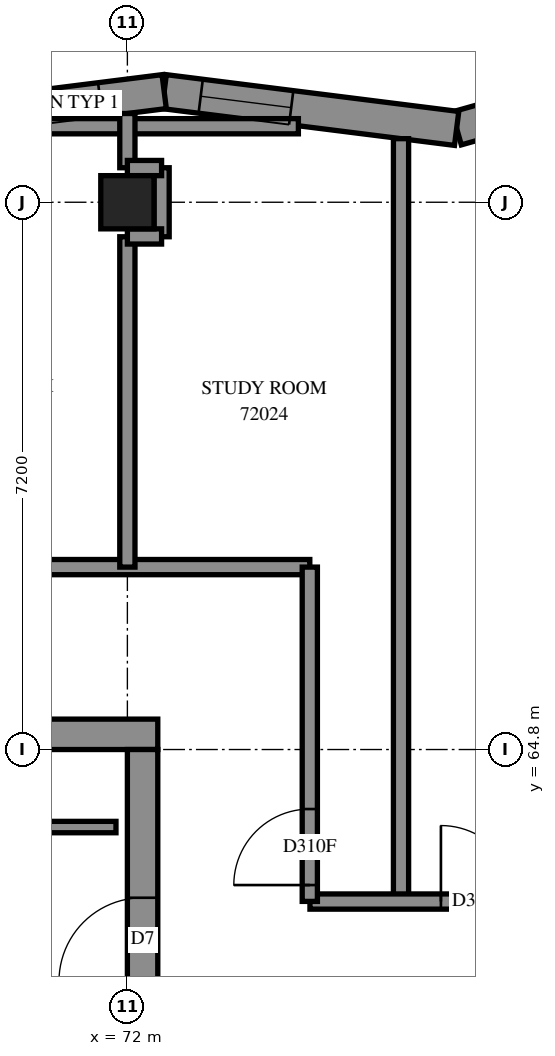
"""IFC4 building model, lengths in metres.
Left out: names, types, materials, properties, quantities, classifications, styles, units other than length and angle.
Written with IfcOpenShell. Run it as: python <this file> out.ifc"""

import sys

from ifc_helpers import new_model, si_unit, direction, frame, frame_2d, origin, origin_2d, place, context, subcontext, project, spatial, polyline, rectangle, outline, extrude, element, fill, save


model = new_model("IFC4")
c1 = context("Model", 3, precision=1e-05, world=origin(), true_north=direction((0.0, 1.0)))
c2 = subcontext(c1, "Body", "Model", "MODEL_VIEW")
j1 = project(units=[si_unit("LENGTHUNIT", "METRE"), si_unit("PLANEANGLEUNIT", "RADIAN")], contexts=[c1])
p1 = place(None, origin())
s1 = spatial("IfcSite", under=j1, at=p1, CompositionType="ELEMENT")
p2 = place(p1, origin())
s2 = spatial("IfcBuilding", under=s1, at=p2, CompositionType="ELEMENT")
p3 = place(p2, frame((0.0, 0.0, 264.2)))
s3 = spatial("IfcBuildingStorey", under=s2, at=p3, CompositionType="ELEMENT", Elevation=264.2)
p4 = place(p3, frame((72.0, 72.0, 0.0), z_axis=(0.0, 0.0, 1.0), x_axis=(1.0, 0.0, 0.0)))
e1 = element("IfcColumn", 1, at=p4, inside=s3, PredefinedType="COLUMN", context=c2, shape_type="SweptSolid", body=[
    extrude(rectangle(XDim=0.7, YDim=0.7, at=origin_2d()), origin(), (0.0, 0.0, 1.0), 3.1),
])
p5 = place(p3, frame((57.2, 65.0, -0.3), z_axis=(0.0, 0.0, 1.0), x_axis=(1.0, 0.0, 0.0)))
e2 = element("IfcWall", 2, at=p5, inside=s3, PredefinedType="SHEAR", context=c2, shape_type="SweptSolid", body=[
    extrude(rectangle(XDim=15.2, YDim=0.4, at=frame_2d((7.6, 0.0))), origin(), (0.0, 0.0, 1.0), 2.7),
])
p6 = place(p5, frame((10.4, 0.0, 0.3)))
e3 = element("IfcOpeningElement", 3, at=p6, cuts=e2, PredefinedType="OPENING", context=c2, shape_type="SweptSolid", body=[
    extrude(rectangle(XDim=0.8, YDim=2.1, at=frame_2d((0.4, 1.05))), frame((0.0, 0.21, 0.0), z_axis=(0.0, -1.0, 0.0), x_axis=(1.0, 0.0, 0.0)), (0.0, 0.0, 1.0), 0.42),
])
p7 = place(p3, frame((72.2, 50.4, -0.3), z_axis=(0.0, 0.0, 1.0), x_axis=(0.0, 1.0, 0.0)))
e4 = element("IfcWall", 4, at=p7, inside=s3, PredefinedType="SHEAR", context=c2, shape_type="SweptSolid", body=[
    extrude(rectangle(XDim=14.4, YDim=0.4, at=frame_2d((7.2, 0.0))), origin(), (0.0, 0.0, 1.0), 2.7),
])
p8 = place(p7, frame((4.55, 0.0, 0.3)))
e5 = element("IfcOpeningElement", 5, at=p8, cuts=e4, PredefinedType="OPENING", context=c2, shape_type="SweptSolid", body=[
    extrude(rectangle(XDim=1.1, YDim=2.1, at=frame_2d((0.55, 1.05))), frame((0.0, 0.21, 0.0), z_axis=(0.0, -1.0, 0.0), x_axis=(1.0, 0.0, 0.0)), (0.0, 0.0, 1.0), 0.42),
])
p9 = place(p7, frame((11.35, 0.0, 0.3)))
e6 = element("IfcOpeningElement", 6, at=p9, cuts=e4, PredefinedType="OPENING", context=c2, shape_type="SweptSolid", body=[
    extrude(rectangle(XDim=1.1, YDim=2.1, at=frame_2d((0.55, 1.05))), frame((0.0, 0.21, 0.0), z_axis=(0.0, -1.0, 0.0), x_axis=(1.0, 0.0, 0.0)), (0.0, 0.0, 1.0), 0.42),
])
p10 = place(p3, frame((80.029, 74.015, 0.0), z_axis=(0.0, 0.0, 1.0), x_axis=(-0.9623447924, -0.2718317505, 0.0)))
e7 = element("IfcWall", 7, at=p10, inside=s3, PredefinedType="SOLIDWALL", context=c2, shape_type="SweptSolid", body=[
    extrude(outline(polyline([(-0.185, -0.225), (3.796, -0.225), (3.887, 0.225), (0.185, 0.225), (-0.185, -0.225)])), origin(), (0.0, 0.0, 1.0), 3.1),
])
p11 = place(p10, frame((1.301, 0.0, 0.45)))
e8 = element("IfcOpeningElement", 8, at=p11, cuts=e7, PredefinedType="OPENING", context=c2, shape_type="SweptSolid", body=[
    extrude(rectangle(XDim=1.2, YDim=2.55, at=frame_2d((0.6, 1.275))), frame((0.0, 0.235, 0.0), z_axis=(0.0, -1.0, 0.0), x_axis=(1.0, 0.0, 0.0)), (0.0, 0.0, 1.0), 0.47),
])
p12 = place(p3, frame((76.332, 72.971, 0.0), z_axis=(0.0, 0.0, 1.0), x_axis=(-0.9921783841, 0.1248280981, 0.0)))
e9 = element("IfcWall", 9, at=p12, inside=s3, PredefinedType="SOLIDWALL", context=c2, shape_type="SweptSolid", body=[
    extrude(outline(polyline([(0.046, -0.225), (3.906, -0.225), (3.85, 0.225), (-0.046, 0.225), (0.046, -0.225)])), origin(), (0.0, 0.0, 1.0), 3.1),
])
p13 = place(p12, frame((2.194, 0.0, 0.45)))
e10 = element("IfcOpeningElement", 10, at=p13, cuts=e9, PredefinedType="OPENING", context=c2, shape_type="SweptSolid", body=[
    extrude(rectangle(XDim=1.2, YDim=2.55, at=frame_2d((0.6, 1.275))), frame((0.0, 0.235, 0.0), z_axis=(0.0, -1.0, 0.0), x_axis=(1.0, 0.0, 0.0)), (0.0, 0.0, 1.0), 0.47),
])
p14 = place(p3, frame((72.484, 73.455, 0.0), z_axis=(0.0, 0.0, 1.0), x_axis=(-0.9921759282, -0.1248476171, 0.0)))
e11 = element("IfcWall", 11, at=p14, inside=s3, PredefinedType="SOLIDWALL", context=c2, shape_type="SweptSolid", body=[
    extrude(outline(polyline([(-0.028, -0.225), (3.832, -0.225), (3.889, 0.225), (0.028, 0.225), (-0.028, -0.225)])), origin(), (0.0, 0.0, 1.0), 3.1),
])
p15 = place(p14, frame((2.042, 0.0, 0.45)))
e12 = element("IfcOpeningElement", 12, at=p15, cuts=e11, PredefinedType="OPENING", context=c2, shape_type="SweptSolid", body=[
    extrude(rectangle(XDim=1.3, YDim=2.5, at=frame_2d((0.65, 1.25))), frame((0.0, 0.235, 0.0), z_axis=(0.0, -1.0, 0.0), x_axis=(1.0, 0.0, 0.0)), (0.0, 0.0, 1.0), 0.47),
])
p16 = place(p14, frame((0.849, 0.0, 0.45)))
e13 = element("IfcOpeningElement", 13, at=p16, cuts=e11, PredefinedType="OPENING", context=c2, shape_type="SweptSolid", body=[
    extrude(rectangle(XDim=0.8, YDim=2.5, at=frame_2d((0.4, 1.25))), frame((0.0, 0.235, 0.0), z_axis=(0.0, -1.0, 0.0), x_axis=(1.0, 0.0, 0.0)), (0.0, 0.0, 1.0), 0.47),
])
p17 = place(p3, frame((64.95, 63.78, 0.0), z_axis=(0.0, 0.0, 1.0), x_axis=(1.0, 0.0, 0.0)))
e14 = element("IfcWall", 14, at=p17, inside=s3, PredefinedType="PARTITIONING", context=c2, shape_type="SweptSolid", body=[
    extrude(rectangle(XDim=6.9, YDim=0.15, at=frame_2d((3.45, 0.0))), origin(), (0.0, 0.0, 1.0), 3.1),
])
p18 = place(p3, frame((55.2, 67.2, 0.0), z_axis=(0.0, 0.0, 1.0), x_axis=(1.0, 0.0, 0.0)))
e15 = element("IfcWall", 15, at=p18, inside=s3, PredefinedType="PARTITIONING", context=c2, shape_type="SweptSolid", body=[
    extrude(rectangle(XDim=19.2, YDim=0.2, at=frame_2d((9.6, 0.0))), origin(), (0.0, 0.0, 1.0), 3.1),
])
p19 = place(p18, frame((4.492, 0.0, 0.0)))
e16 = element("IfcOpeningElement", 16, at=p19, cuts=e15, PredefinedType="OPENING", context=c2, shape_type="SweptSolid", body=[
    extrude(rectangle(XDim=1.0, YDim=2.1, at=frame_2d((0.5, 1.05))), frame((0.0, 0.11, 0.0), z_axis=(0.0, -1.0, 0.0), x_axis=(1.0, 0.0, 0.0)), (0.0, 0.0, 1.0), 0.22),
])
p20 = place(p18, frame((6.567, 0.0, 0.0)))
e17 = element("IfcOpeningElement", 17, at=p20, cuts=e15, PredefinedType="OPENING", context=c2, shape_type="SweptSolid", body=[
    extrude(rectangle(XDim=1.0, YDim=2.1, at=frame_2d((0.5, 1.05))), frame((0.0, 0.11, 0.0), z_axis=(0.0, -1.0, 0.0), x_axis=(1.0, 0.0, 0.0)), (0.0, 0.0, 1.0), 0.22),
])
p21 = place(p18, frame((11.693, 0.0, 0.0)))
e18 = element("IfcOpeningElement", 18, at=p21, cuts=e15, PredefinedType="OPENING", context=c2, shape_type="SweptSolid", body=[
    extrude(rectangle(XDim=1.0, YDim=2.1, at=frame_2d((0.5, 1.05))), frame((0.0, 0.11, 0.0), z_axis=(0.0, -1.0, 0.0), x_axis=(1.0, 0.0, 0.0)), (0.0, 0.0, 1.0), 0.22),
])
p22 = place(p18, frame((13.88, 0.0, 0.0)))
e19 = element("IfcOpeningElement", 19, at=p22, cuts=e15, PredefinedType="OPENING", context=c2, shape_type="SweptSolid", body=[
    extrude(rectangle(XDim=1.0, YDim=2.1, at=frame_2d((0.5, 1.05))), frame((0.0, 0.11, 0.0), z_axis=(0.0, -1.0, 0.0), x_axis=(1.0, 0.0, 0.0)), (0.0, 0.0, 1.0), 0.22),
])
p23 = place(p3, frame((75.6, 62.8, 0.0), z_axis=(0.0, 0.0, 1.0), x_axis=(0.0, 1.0, 0.0)))
e20 = element("IfcWall", 20, at=p23, inside=s3, PredefinedType="PARTITIONING", context=c2, shape_type="SweptSolid", body=[
    extrude(rectangle(XDim=10.036, YDim=0.2, at=frame_2d((5.018, 0.0))), origin(), (0.0, 0.0, 1.0), 3.1),
])
p24 = place(p3, frame((74.402, 62.8, 0.0), z_axis=(0.0, 0.0, 1.0), x_axis=(1.0, 0.0, 0.0)))
e21 = element("IfcWall", 21, at=p24, inside=s3, PredefinedType="PARTITIONING", context=c2, shape_type="SweptSolid", body=[
    extrude(rectangle(XDim=4.798, YDim=0.2, at=frame_2d((2.399, 0.0))), origin(), (0.0, 0.0, 1.0), 3.1),
])
p25 = place(p24, frame((1.723, 0.0, 0.0)))
e22 = element("IfcOpeningElement", 22, at=p25, cuts=e21, PredefinedType="OPENING", context=c2, shape_type="SweptSolid", body=[
    extrude(rectangle(XDim=1.0, YDim=2.1, at=frame_2d((0.5, 1.05))), frame((0.0, 0.11, 0.0), z_axis=(0.0, -1.0, 0.0), x_axis=(1.0, 0.0, 0.0)), (0.0, 0.0, 1.0), 0.22),
])
p26 = place(p3, frame((74.4, 62.802, 0.0), z_axis=(0.0, 0.0, 1.0), x_axis=(0.0, 1.0, 0.0)))
e23 = element("IfcWall", 23, at=p26, inside=s3, PredefinedType="PARTITIONING", context=c2, shape_type="SweptSolid", body=[
    extrude(rectangle(XDim=4.398, YDim=0.2, at=frame_2d((2.199, 0.0))), origin(), (0.0, 0.0, 1.0), 3.1),
])
p27 = place(p26, frame((0.215, 0.0, 0.0)))
e24 = element("IfcOpeningElement", 24, at=p27, cuts=e23, PredefinedType="OPENING", context=c2, shape_type="SweptSolid", body=[
    extrude(rectangle(XDim=1.0, YDim=2.1, at=frame_2d((0.5, 1.05))), frame((0.0, 0.11, 0.0), z_axis=(0.0, -1.0, 0.0), x_axis=(1.0, 0.0, 0.0)), (0.0, 0.0, 1.0), 0.22),
])
p28 = place(p3, frame((72.0, 67.2, 0.0), z_axis=(0.0, 0.0, 1.0), x_axis=(0.0, 1.0, 0.0)))
e25 = element("IfcWall", 25, at=p28, inside=s3, PredefinedType="PARTITIONING", context=c2, shape_type="SweptSolid", body=[
    extrude(rectangle(XDim=4.346, YDim=0.2, at=frame_2d((2.173, 0.0))), origin(), (0.0, 0.0, 1.0), 3.1),
])
p29 = place(p3, frame((70.719, 73.0, 0.0), z_axis=(0.0, 0.0, 1.0), x_axis=(1.0, 0.0, 0.0)))
e26 = element("IfcWall", 26, at=p29, inside=s3, PredefinedType="PARTITIONING", context=c2, shape_type="SweptSolid", body=[
    extrude(rectangle(XDim=3.531, YDim=0.2, at=frame_2d((1.766, 0.0))), origin(), (0.0, 0.0, 1.0), 3.1),
])
p30 = place(p3, frame((72.45, 71.546, 0.0), z_axis=(0.0, 0.0, 1.0), x_axis=(0.0, 1.0, 0.0)))
e27 = element("IfcWall", 27, at=p30, inside=s3, PredefinedType="PARTITIONING", context=c2, shape_type="SweptSolid", body=[
    extrude(rectangle(XDim=0.908, YDim=0.2, at=frame_2d((0.454, 0.0))), origin(), (0.0, 0.0, 1.0), 3.1),
])
p31 = place(p3, frame((72.0, 72.454, 0.0), z_axis=(0.0, 0.0, 1.0), x_axis=(0.0, 1.0, 0.0)))
e28 = element("IfcWall", 28, at=p31, inside=s3, PredefinedType="PARTITIONING", context=c2, shape_type="SweptSolid", body=[
    extrude(rectangle(XDim=0.714, YDim=0.2, at=frame_2d((0.357, 0.0))), origin(), (0.0, 0.0, 1.0), 3.1),
])
for number, where, z_axis, x_axis in (
    (29, (72.0, 71.55, 0.0), (0.0, 0.0, 1.0), (1.0, 0.0, 0.0)),
    (30, (72.0, 72.45, 0.0), (0.0, 0.0, 1.0), (1.0, 0.0, 0.0)),
):
    element("IfcWall", number, at=place(p3, frame(where, z_axis=z_axis, x_axis=x_axis)), inside=s3, PredefinedType="PARTITIONING", context=c2, shape_type="SweptSolid", body=[
        extrude(rectangle(XDim=0.45, YDim=0.2, at=frame_2d((0.225, 0.0))), origin(), (0.0, 0.0, 1.0), 3.1),
    ])
p32 = place(p13, origin())
e31 = element("IfcWindow", 31, at=p32, inside=s3, PartitioningType="SINGLE_PANEL", PredefinedType="WINDOW", context=c2, shape_type="SweptSolid", body=[
    extrude(rectangle(XDim=1.2, YDim=2.55, at=frame_2d((0.6, 1.275))), frame((0.0, 0.115, 0.0), z_axis=(0.0, -1.0, 0.0), x_axis=(1.0, 0.0, 0.0)), (0.0, 0.0, 1.0), 0.06),
])
fill(e10, e31)
p33 = place(p9, origin())
e32 = element("IfcDoor", 32, at=p33, inside=s3, OperationType="SINGLE_SWING_RIGHT", PredefinedType="DOOR", context=c2, shape_type="SweptSolid", body=[
    extrude(rectangle(XDim=1.1, YDim=2.1, at=frame_2d((0.55, 1.05))), frame((0.0, 0.025, 0.0), z_axis=(0.0, -1.0, 0.0), x_axis=(1.0, 0.0, 0.0)), (0.0, 0.0, 1.0), 0.05),
])
fill(e6, e32)
p34 = place(p27, origin())
e33 = element("IfcDoor", 33, at=p34, inside=s3, OperationType="SINGLE_SWING_RIGHT", PredefinedType="DOOR", context=c2, shape_type="SweptSolid", body=[
    extrude(rectangle(XDim=1.0, YDim=2.1, at=frame_2d((0.5, 1.05))), frame((0.0, 0.025, 0.0), z_axis=(0.0, -1.0, 0.0), x_axis=(1.0, 0.0, 0.0)), (0.0, 0.0, 1.0), 0.05),
])
fill(e24, e33)
p35 = place(p25, origin())
e34 = element("IfcDoor", 34, at=p35, inside=s3, OperationType="SINGLE_SWING_LEFT", PredefinedType="DOOR", context=c2, shape_type="SweptSolid", body=[
    extrude(rectangle(XDim=1.0, YDim=2.1, at=frame_2d((0.5, 1.05))), frame((0.0, 0.025, 0.0), z_axis=(0.0, -1.0, 0.0), x_axis=(1.0, 0.0, 0.0)), (0.0, 0.0, 1.0), 0.05),
])
fill(e22, e34)
p36 = place(p16, origin())
e35 = element("IfcWindow", 35, at=p36, inside=s3, PartitioningType="SINGLE_PANEL", PredefinedType="WINDOW", context=c2, shape_type="SweptSolid", body=[
    extrude(rectangle(XDim=0.8, YDim=2.5, at=frame_2d((0.4, 1.25))), frame((0.0, 0.115, 0.0), z_axis=(0.0, -1.0, 0.0), x_axis=(1.0, 0.0, 0.0)), (0.0, 0.0, 1.0), 0.06),
])
fill(e13, e35)
save(model, sys.argv[1])
